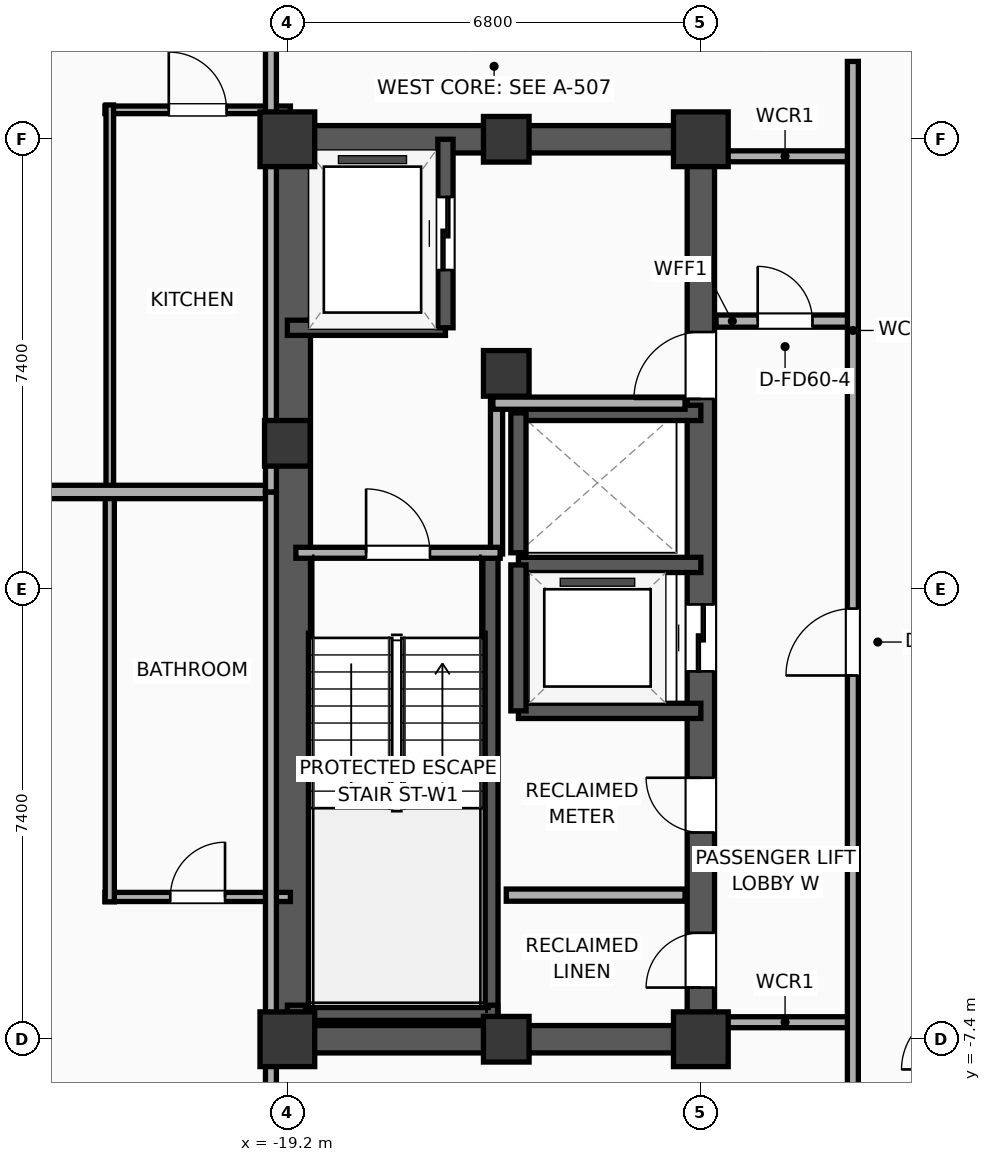
"""IFC4 building model, lengths in metres.
Left out: names, types, materials, properties, quantities, classifications, styles, units other than length and angle.
Written with IfcOpenShell. Run it as: python <this file> out.ifc"""

import sys

from ifc_helpers import new_model, si_unit, direction, frame, frame_2d, origin, origin_2d, place, context, subcontext, project, spatial, rectangle, extrude, element, fill, save


model = new_model("IFC4")
c1 = context("Model", 3, precision=1e-05, world=origin(), true_north=direction((0.0, 1.0)))
c2 = subcontext(c1, "Body", "Model", "MODEL_VIEW")
j1 = project(units=[si_unit("LENGTHUNIT", "METRE"), si_unit("PLANEANGLEUNIT", "RADIAN")], contexts=[c1])
p1 = place(None, origin())
s1 = spatial("IfcSite", under=j1, at=p1, CompositionType="ELEMENT")
p2 = place(p1, origin())
s2 = spatial("IfcBuilding", under=s1, at=p2, CompositionType="ELEMENT")
p3 = place(p2, frame((0.0, 0.0, 167.7)))
s3 = spatial("IfcBuildingStorey", under=s2, at=p3, CompositionType="ELEMENT", Elevation=167.7)
p4 = place(p3, frame((-19.2, -7.4, 0.0), z_axis=(0.0, 0.0, 1.0), x_axis=(1.0, 0.0, 0.0)))
e1 = element("IfcColumn", 1, at=p4, inside=s3, PredefinedType="COLUMN", context=c2, shape_type="SweptSolid", body=[
    extrude(rectangle(XDim=0.9, YDim=0.9, at=origin_2d()), origin(), (0.0, 0.0, 1.0), 3.9),
])
p5 = place(p3, frame((-19.2, 2.4, 0.0), z_axis=(0.0, 0.0, 1.0), x_axis=(1.0, 0.0, 0.0)))
e2 = element("IfcColumn", 2, at=p5, inside=s3, PredefinedType="COLUMN", context=c2, shape_type="SweptSolid", body=[
    extrude(rectangle(XDim=0.75, YDim=0.75, at=origin_2d()), origin(), (0.0, 0.0, 1.0), 3.9),
])
p6 = place(p3, frame((-19.2, 7.4, 0.0), z_axis=(0.0, 0.0, 1.0), x_axis=(1.0, 0.0, 0.0)))
e3 = element("IfcColumn", 3, at=p6, inside=s3, PredefinedType="COLUMN", context=c2, shape_type="SweptSolid", body=[
    extrude(rectangle(XDim=0.9, YDim=0.9, at=origin_2d()), origin(), (0.0, 0.0, 1.0), 3.9),
])
for number, where, z_axis, x_axis in (
    (4, (-15.6, -7.4, 0.0), (0.0, 0.0, 1.0), (1.0, 0.0, 0.0)),
    (5, (-15.6, 7.4, 0.0), (0.0, 0.0, 1.0), (1.0, 0.0, 0.0)),
):
    element("IfcColumn", number, at=place(p3, frame(where, z_axis=z_axis, x_axis=x_axis)), inside=s3, PredefinedType="COLUMN", context=c2, shape_type="SweptSolid", body=[
        extrude(rectangle(XDim=0.75, YDim=0.75, at=origin_2d()), origin(), (0.0, 0.0, 1.0), 3.9),
    ])
p7 = place(p3, frame((-12.4, -7.4, 0.0), z_axis=(0.0, 0.0, 1.0), x_axis=(1.0, 0.0, 0.0)))
e6 = element("IfcColumn", 6, at=p7, inside=s3, PredefinedType="COLUMN", context=c2, shape_type="SweptSolid", body=[
    extrude(rectangle(XDim=0.9, YDim=0.9, at=origin_2d()), origin(), (0.0, 0.0, 1.0), 3.9),
])
p8 = place(p3, frame((-15.6, 3.55, 0.0), z_axis=(0.0, 0.0, 1.0), x_axis=(1.0, 0.0, 0.0)))
e7 = element("IfcColumn", 7, at=p8, inside=s3, PredefinedType="COLUMN", context=c2, shape_type="SweptSolid", body=[
    extrude(rectangle(XDim=0.75, YDim=0.75, at=origin_2d()), origin(), (0.0, 0.0, 1.0), 3.9),
])
p9 = place(p3, frame((-12.4, 7.4, 0.0), z_axis=(0.0, 0.0, 1.0), x_axis=(1.0, 0.0, 0.0)))
e8 = element("IfcColumn", 8, at=p9, inside=s3, PredefinedType="COLUMN", context=c2, shape_type="SweptSolid", body=[
    extrude(rectangle(XDim=0.9, YDim=0.9, at=origin_2d()), origin(), (0.0, 0.0, 1.0), 3.9),
])
for number, where, z_axis, x_axis in (
    (9, (-19.425, -7.4, 0.0), (0.0, 0.0, 1.0), (1.0, 0.0, 0.0)),
    (10, (-19.425, 7.4, 0.0), (0.0, 0.0, 1.0), (1.0, 0.0, 0.0)),
):
    element("IfcWall", number, at=place(p3, frame(where, z_axis=z_axis, x_axis=x_axis)), inside=s3, PredefinedType="SHEAR", context=c2, shape_type="SweptSolid", body=[
        extrude(rectangle(XDim=7.25, YDim=0.45, at=frame_2d((3.625, 0.0))), origin(), (0.0, 0.0, 1.0), 3.65),
    ])
p10 = place(p3, frame((-19.145, -7.4, 0.0), z_axis=(0.0, 0.0, 1.0), x_axis=(0.0, 1.0, 0.0)))
e11 = element("IfcWall", 11, at=p10, inside=s3, PredefinedType="SHEAR", context=c2, shape_type="SweptSolid", body=[
    extrude(rectangle(XDim=14.8, YDim=0.65, at=frame_2d((7.4, 0.0))), origin(), (0.0, 0.0, 1.0), 3.65),
])
p11 = place(p3, frame((-12.4, -7.4, 0.0), z_axis=(0.0, 0.0, 1.0), x_axis=(0.0, 1.0, 0.0)))
e12 = element("IfcWall", 12, at=p11, inside=s3, PredefinedType="SHEAR", context=c2, shape_type="SweptSolid", body=[
    extrude(rectangle(XDim=14.8, YDim=0.45, at=frame_2d((7.4, 0.0))), origin(), (0.0, 0.0, 1.0), 3.65),
])
p12 = place(p11, frame((6.05, 0.0, 0.0)))
e13 = element("IfcOpeningElement", 13, at=p12, cuts=e12, PredefinedType="OPENING", context=c2, shape_type="SweptSolid", body=[
    extrude(rectangle(XDim=1.1, YDim=2.05, at=frame_2d((0.55, 1.025))), frame((0.0, 0.235, 0.0), z_axis=(0.0, -1.0, 0.0), x_axis=(1.0, 0.0, 0.0)), (0.0, 0.0, 1.0), 0.47),
])
p13 = place(p11, frame((10.53, 0.0, 0.0)))
e14 = element("IfcOpeningElement", 14, at=p13, cuts=e12, PredefinedType="OPENING", context=c2, shape_type="SweptSolid", body=[
    extrude(rectangle(XDim=1.1, YDim=2.05, at=frame_2d((0.55, 1.025))), frame((0.0, 0.235, 0.0), z_axis=(0.0, -1.0, 0.0), x_axis=(1.0, 0.0, 0.0)), (0.0, 0.0, 1.0), 0.47),
])
p14 = place(p11, frame((0.85, 0.0, 0.0)))
e15 = element("IfcOpeningElement", 15, at=p14, cuts=e12, PredefinedType="OPENING", context=c2, shape_type="SweptSolid", body=[
    extrude(rectangle(XDim=0.9, YDim=2.05, at=frame_2d((0.45, 1.025))), frame((0.0, 0.235, 0.0), z_axis=(0.0, -1.0, 0.0), x_axis=(1.0, 0.0, 0.0)), (0.0, 0.0, 1.0), 0.47),
])
p15 = place(p11, frame((3.4, 0.0, 0.0)))
e16 = element("IfcOpeningElement", 16, at=p15, cuts=e12, PredefinedType="OPENING", context=c2, shape_type="SweptSolid", body=[
    extrude(rectangle(XDim=0.9, YDim=2.05, at=frame_2d((0.45, 1.025))), frame((0.0, 0.235, 0.0), z_axis=(0.0, -1.0, 0.0), x_axis=(1.0, 0.0, 0.0)), (0.0, 0.0, 1.0), 0.47),
])
p16 = place(p3, frame((-15.86, -7.085, 0.0), z_axis=(0.0, 0.0, 1.0), x_axis=(0.0, 1.0, 0.0)))
e17 = element("IfcWall", 17, at=p16, inside=s3, PredefinedType="SOLIDWALL", context=c2, shape_type="SweptSolid", body=[
    extrude(rectangle(XDim=7.685, YDim=0.25, at=frame_2d((3.843, 0.0))), origin(), (0.0, 0.0, 1.0), 3.65),
])
p17 = place(p3, frame((-19.2, -6.965, 0.0), z_axis=(0.0, 0.0, 1.0), x_axis=(1.0, 0.0, 0.0)))
e18 = element("IfcWall", 18, at=p17, inside=s3, PredefinedType="SOLIDWALL", context=c2, shape_type="SweptSolid", body=[
    extrude(rectangle(XDim=3.46, YDim=0.25, at=frame_2d((1.73, 0.0))), origin(), (0.0, 0.0, 1.0), 3.65),
])
p18 = place(p3, frame((-19.2, 4.3, 0.0), z_axis=(0.0, 0.0, 1.0), x_axis=(1.0, 0.0, 0.0)))
e19 = element("IfcWall", 19, at=p18, inside=s3, PredefinedType="SOLIDWALL", context=c2, shape_type="SweptSolid", body=[
    extrude(rectangle(XDim=2.6, YDim=0.25, at=frame_2d((1.3, 0.0))), origin(), (0.0, 0.0, 1.0), 3.65),
])
p19 = place(p3, frame((-16.6, 4.3, 0.0), z_axis=(0.0, 0.0, 1.0), x_axis=(0.0, 1.0, 0.0)))
e20 = element("IfcWall", 20, at=p19, inside=s3, PredefinedType="SOLIDWALL", context=c2, shape_type="SweptSolid", body=[
    extrude(rectangle(XDim=3.1, YDim=0.25, at=frame_2d((1.55, 0.0))), origin(), (0.0, 0.0, 1.0), 3.65),
])
p20 = place(p19, frame((0.95, 0.0, 0.0)))
e21 = element("IfcOpeningElement", 21, at=p20, cuts=e20, PredefinedType="OPENING", context=c2, shape_type="SweptSolid", body=[
    extrude(rectangle(XDim=1.2, YDim=2.05, at=frame_2d((0.6, 1.025))), frame((0.0, 0.135, 0.0), z_axis=(0.0, -1.0, 0.0), x_axis=(1.0, 0.0, 0.0)), (0.0, 0.0, 1.0), 0.27),
])
for number, where, z_axis, x_axis in (
    (22, (-15.4, -2.0, 0.0), (0.0, 0.0, 1.0), (1.0, 0.0, 0.0)),
    (23, (-12.4, 0.4, 0.0), (0.0, 0.0, 1.0), (-1.0, 0.0, 0.0)),
):
    element("IfcWall", number, at=place(p3, frame(where, z_axis=z_axis, x_axis=x_axis)), inside=s3, PredefinedType="SOLIDWALL", context=c2, shape_type="SweptSolid", body=[
        extrude(rectangle(XDim=3.0, YDim=0.25, at=frame_2d((1.5, 0.0))), origin(), (0.0, 0.0, 1.0), 3.65),
    ])
p21 = place(p3, frame((-15.4, 0.4, 0.0), z_axis=(0.0, 0.0, 1.0), x_axis=(0.0, -1.0, 0.0)))
e24 = element("IfcWall", 24, at=p21, inside=s3, PredefinedType="SOLIDWALL", context=c2, shape_type="SweptSolid", body=[
    extrude(rectangle(XDim=2.4, YDim=0.25, at=frame_2d((1.2, 0.0))), origin(), (0.0, 0.0, 1.0), 3.65),
])
p22 = place(p3, frame((-12.4, 2.9, 0.0), z_axis=(0.0, 0.0, 1.0), x_axis=(-1.0, 0.0, 0.0)))
e25 = element("IfcWall", 25, at=p22, inside=s3, PredefinedType="SOLIDWALL", context=c2, shape_type="SweptSolid", body=[
    extrude(rectangle(XDim=3.0, YDim=0.25, at=frame_2d((1.5, 0.0))), origin(), (0.0, 0.0, 1.0), 3.65),
])
p23 = place(p3, frame((-15.4, 2.9, 0.0), z_axis=(0.0, 0.0, 1.0), x_axis=(0.0, -1.0, 0.0)))
e26 = element("IfcWall", 26, at=p23, inside=s3, PredefinedType="SOLIDWALL", context=c2, shape_type="SweptSolid", body=[
    extrude(rectangle(XDim=2.3, YDim=0.25, at=frame_2d((1.15, 0.0))), origin(), (0.0, 0.0, 1.0), 3.65),
])
p24 = place(p3, frame((-15.76, 0.58, 0.0), z_axis=(0.0, 0.0, 1.0), x_axis=(0.0, 1.0, 0.0)))
e27 = element("IfcWall", 27, at=p24, inside=s3, PredefinedType="PARTITIONING", context=c2, shape_type="SweptSolid", body=[
    extrude(rectangle(XDim=2.52, YDim=0.2, at=frame_2d((1.26, 0.0))), origin(), (0.0, 0.0, 1.0), 3.65),
])
p25 = place(p3, frame((-15.82, 3.06, 0.0), z_axis=(0.0, 0.0, 1.0), x_axis=(1.0, 0.0, 0.0)))
e28 = element("IfcWall", 28, at=p25, inside=s3, PredefinedType="PARTITIONING", context=c2, shape_type="SweptSolid", body=[
    extrude(rectangle(XDim=3.16, YDim=0.2, at=frame_2d((1.58, 0.0))), origin(), (0.0, 0.0, 1.0), 3.65),
])
p26 = place(p3, frame((-19.06, 0.6, 0.0), z_axis=(0.0, 0.0, 1.0), x_axis=(1.0, 0.0, 0.0)))
e29 = element("IfcWall", 29, at=p26, inside=s3, PredefinedType="PARTITIONING", context=c2, shape_type="SweptSolid", body=[
    extrude(rectangle(XDim=3.36, YDim=0.18, at=frame_2d((1.68, 0.0))), origin(), (0.0, 0.0, 1.0), 3.65),
])
p27 = place(p26, frame((1.155, 0.0, 0.0)))
e30 = element("IfcOpeningElement", 30, at=p27, cuts=e29, PredefinedType="OPENING", context=c2, shape_type="SweptSolid", body=[
    extrude(rectangle(XDim=1.05, YDim=2.05, at=frame_2d((0.525, 1.025))), frame((0.0, 0.1, 0.0), z_axis=(0.0, -1.0, 0.0), x_axis=(1.0, 0.0, 0.0)), (0.0, 0.0, 1.0), 0.2),
])
p28 = place(p3, frame((-15.6, -5.03, 0.0), z_axis=(0.0, 0.0, 1.0), x_axis=(1.0, 0.0, 0.0)))
e31 = element("IfcWall", 31, at=p28, inside=s3, PredefinedType="PARTITIONING", context=c2, shape_type="SweptSolid", body=[
    extrude(rectangle(XDim=2.94, YDim=0.2, at=frame_2d((1.47, 0.0))), origin(), (0.0, 0.0, 1.0), 3.65),
])
p29 = place(p3, frame((-12.15, 4.41, 0.0), z_axis=(0.0, 0.0, 1.0), x_axis=(1.0, 0.0, 0.0)))
e32 = element("IfcWall", 32, at=p29, inside=s3, PredefinedType="PARTITIONING", context=c2, shape_type="SweptSolid", body=[
    extrude(rectangle(XDim=2.27, YDim=0.2, at=frame_2d((1.135, 0.0))), origin(), (0.0, 0.0, 1.0), 3.65),
])
p30 = place(p29, frame((0.685, 0.0, 0.0)))
e33 = element("IfcOpeningElement", 33, at=p30, cuts=e32, PredefinedType="OPENING", context=c2, shape_type="SweptSolid", body=[
    extrude(rectangle(XDim=0.9, YDim=2.05, at=frame_2d((0.45, 1.025))), frame((0.0, 0.11, 0.0), z_axis=(0.0, -1.0, 0.0), x_axis=(1.0, 0.0, 0.0)), (0.0, 0.0, 1.0), 0.22),
])
for number, where, z_axis, x_axis in (
    (34, (-12.15, 7.12, 0.0), (0.0, 0.0, 1.0), (1.0, 0.0, 0.0)),
    (35, (-12.15, -7.12, 0.0), (0.0, 0.0, 1.0), (1.0, 0.0, 0.0)),
):
    element("IfcWall", number, at=place(p3, frame(where, z_axis=z_axis, x_axis=x_axis)), inside=s3, PredefinedType="PARTITIONING", context=c2, shape_type="SweptSolid", body=[
        extrude(rectangle(XDim=2.27, YDim=0.18, at=frame_2d((1.135, 0.0))), origin(), (0.0, 0.0, 1.0), 3.65),
    ])
p31 = place(p3, frame((-9.9, -8.68, 0.0), z_axis=(0.0, 0.0, 1.0), x_axis=(0.0, 1.0, 0.0)))
e36 = element("IfcWall", 36, at=p31, inside=s3, PredefinedType="PARTITIONING", context=c2, shape_type="SweptSolid", body=[
    extrude(rectangle(XDim=17.36, YDim=0.18, at=frame_2d((8.68, 0.0))), origin(), (0.0, 0.0, 1.0), 3.65),
])
p32 = place(p31, frame((7.262, 0.0, 0.0)))
e37 = element("IfcOpeningElement", 37, at=p32, cuts=e36, PredefinedType="OPENING", context=c2, shape_type="SweptSolid", body=[
    extrude(rectangle(XDim=1.1, YDim=2.05, at=frame_2d((0.55, 1.025))), frame((0.0, 0.1, 0.0), z_axis=(0.0, -1.0, 0.0), x_axis=(1.0, 0.0, 0.0)), (0.0, 0.0, 1.0), 0.2),
])
p33 = place(p3, frame((-22.2, -5.06, 0.0), z_axis=(0.0, 0.0, 1.0), x_axis=(1.0, 0.0, 0.0)))
e38 = element("IfcWall", 38, at=p33, inside=s3, PredefinedType="PLUMBINGWALL", context=c2, shape_type="SweptSolid", body=[
    extrude(rectangle(XDim=3.05, YDim=0.15, at=frame_2d((1.525, 0.0))), origin(), (0.0, 0.0, 1.0), 3.65),
])
p34 = place(p33, frame((1.075, 0.0, 0.0)))
e39 = element("IfcOpeningElement", 39, at=p34, cuts=e38, PredefinedType="OPENING", context=c2, shape_type="SweptSolid", body=[
    extrude(rectangle(XDim=0.9, YDim=2.05, at=frame_2d((0.45, 1.025))), frame((0.0, 0.085, 0.0), z_axis=(0.0, -1.0, 0.0), x_axis=(1.0, 0.0, 0.0)), (0.0, 0.0, 1.0), 0.17),
])
p35 = place(p3, frame((-22.12, -5.14, 0.0), z_axis=(0.0, 0.0, 1.0), x_axis=(0.0, 1.0, 0.0)))
e40 = element("IfcWall", 40, at=p35, inside=s3, PredefinedType="PLUMBINGWALL", context=c2, shape_type="SweptSolid", body=[
    extrude(rectangle(XDim=6.72, YDim=0.15, at=frame_2d((3.36, 0.0))), origin(), (0.0, 0.0, 1.0), 3.65),
])
p36 = place(p3, frame((-22.2, 7.884, 0.0), z_axis=(0.0, 0.0, 1.0), x_axis=(1.0, 0.0, 0.0)))
e41 = element("IfcWall", 41, at=p36, inside=s3, PredefinedType="PARTITIONING", context=c2, shape_type="SweptSolid", body=[
    extrude(rectangle(XDim=3.05, YDim=0.125, at=frame_2d((1.525, 0.0))), origin(), (0.0, 0.0, 1.0), 3.65),
])
p37 = place(p36, frame((1.05, 0.0, 0.0)))
e42 = element("IfcOpeningElement", 42, at=p37, cuts=e41, PredefinedType="OPENING", context=c2, shape_type="SweptSolid", body=[
    extrude(rectangle(XDim=0.95, YDim=2.05, at=frame_2d((0.475, 1.025))), frame((0.0, 0.073, 0.0), z_axis=(0.0, -1.0, 0.0), x_axis=(1.0, 0.0, 0.0)), (0.0, 0.0, 1.0), 0.145),
])
p38 = place(p3, frame((-22.12, 1.62, 0.0), z_axis=(0.0, 0.0, 1.0), x_axis=(0.0, 1.0, 0.0)))
e43 = element("IfcWall", 43, at=p38, inside=s3, PredefinedType="PARTITIONING", context=c2, shape_type="SweptSolid", body=[
    extrude(rectangle(XDim=6.344, YDim=0.125, at=frame_2d((3.172, 0.0))), origin(), (0.0, 0.0, 1.0), 3.65),
])
p39 = place(p3, frame((-19.47, 1.6, 0.0), z_axis=(0.0, 0.0, 1.0), x_axis=(-1.0, 0.0, 0.0)))
e44 = element("IfcWall", 44, at=p39, inside=s3, PredefinedType="PARTITIONING", context=c2, shape_type="SweptSolid", body=[
    extrude(rectangle(XDim=13.754, YDim=0.22, at=frame_2d((6.877, 0.0))), origin(), (0.0, 0.0, 1.0), 3.65),
])
p40 = place(p3, frame((-19.47, -22.652, 0.0), z_axis=(0.0, 0.0, 1.0), x_axis=(0.0, 1.0, 0.0)))
e45 = element("IfcWall", 45, at=p40, inside=s3, PredefinedType="PARTITIONING", context=c2, shape_type="SweptSolid", body=[
    extrude(rectangle(XDim=24.252, YDim=0.18, at=frame_2d((12.126, 0.0))), origin(), (0.0, 0.0, 1.0), 3.65),
])
p41 = place(p40, frame((12.871, 0.0, 0.0)))
e46 = element("IfcOpeningElement", 46, at=p41, cuts=e45, PredefinedType="OPENING", context=c2, shape_type="SweptSolid", body=[
    extrude(rectangle(XDim=0.9, YDim=2.05, at=frame_2d((0.45, 1.025))), frame((0.0, 0.1, 0.0), z_axis=(0.0, -1.0, 0.0), x_axis=(1.0, 0.0, 0.0)), (0.0, 0.0, 1.0), 0.2),
])
p42 = place(p3, frame((-19.47, 1.6, 0.0), z_axis=(0.0, 0.0, 1.0), x_axis=(0.0, 1.0, 0.0)))
e47 = element("IfcWall", 47, at=p42, inside=s3, PredefinedType="PARTITIONING", context=c2, shape_type="SweptSolid", body=[
    extrude(rectangle(XDim=16.431, YDim=0.18, at=frame_2d((8.216, 0.0))), origin(), (0.0, 0.0, 1.0), 3.04),
])
p43 = place(p42, frame((7.279, 0.0, 0.0)))
e48 = element("IfcOpeningElement", 48, at=p43, cuts=e47, PredefinedType="OPENING", context=c2, shape_type="SweptSolid", body=[
    extrude(rectangle(XDim=0.9, YDim=2.05, at=frame_2d((0.45, 1.025))), frame((0.0, 0.1, 0.0), z_axis=(0.0, -1.0, 0.0), x_axis=(1.0, 0.0, 0.0)), (0.0, 0.0, 1.0), 0.2),
])
p44 = place(p20, origin())
e49 = element("IfcDoor", 49, at=p44, inside=s3, OperationType="SLIDING_TO_LEFT", PredefinedType="DOOR", context=c2, shape_type="SweptSolid", body=[
    extrude(rectangle(XDim=1.2, YDim=2.05, at=frame_2d((0.6, 1.025))), frame((0.0, 0.025, 0.0), z_axis=(0.0, -1.0, 0.0), x_axis=(1.0, 0.0, 0.0)), (0.0, 0.0, 1.0), 0.05),
])
fill(e21, e49)
p45 = place(p12, origin())
e50 = element("IfcDoor", 50, at=p45, inside=s3, OperationType="SLIDING_TO_LEFT", PredefinedType="DOOR", context=c2, shape_type="SweptSolid", body=[
    extrude(rectangle(XDim=1.1, YDim=2.05, at=frame_2d((0.55, 1.025))), frame((0.0, 0.025, 0.0), z_axis=(0.0, -1.0, 0.0), x_axis=(1.0, 0.0, 0.0)), (0.0, 0.0, 1.0), 0.05),
])
fill(e13, e50)
p46 = place(p27, origin())
e51 = element("IfcDoor", 51, at=p46, inside=s3, OperationType="SINGLE_SWING_LEFT", PredefinedType="DOOR", context=c2, shape_type="SweptSolid", body=[
    extrude(rectangle(XDim=1.05, YDim=2.05, at=frame_2d((0.525, 1.025))), frame((0.0, 0.025, 0.0), z_axis=(0.0, -1.0, 0.0), x_axis=(1.0, 0.0, 0.0)), (0.0, 0.0, 1.0), 0.05),
])
fill(e30, e51)
p47 = place(p30, origin())
e52 = element("IfcDoor", 52, at=p47, inside=s3, OperationType="SINGLE_SWING_LEFT", PredefinedType="DOOR", context=c2, shape_type="SweptSolid", body=[
    extrude(rectangle(XDim=0.9, YDim=2.05, at=frame_2d((0.45, 1.025))), frame((0.0, 0.025, 0.0), z_axis=(0.0, -1.0, 0.0), x_axis=(1.0, 0.0, 0.0)), (0.0, 0.0, 1.0), 0.05),
])
fill(e33, e52)
p48 = place(p32, origin())
e53 = element("IfcDoor", 53, at=p48, inside=s3, OperationType="SINGLE_SWING_LEFT", PredefinedType="DOOR", context=c2, shape_type="SweptSolid", body=[
    extrude(rectangle(XDim=1.1, YDim=2.05, at=frame_2d((0.55, 1.025))), frame((0.0, 0.025, 0.0), z_axis=(0.0, -1.0, 0.0), x_axis=(1.0, 0.0, 0.0)), (0.0, 0.0, 1.0), 0.05),
])
fill(e37, e53)
p49 = place(p34, origin())
e54 = element("IfcDoor", 54, at=p49, inside=s3, OperationType="SINGLE_SWING_RIGHT", PredefinedType="DOOR", context=c2, shape_type="SweptSolid", body=[
    extrude(rectangle(XDim=0.9, YDim=2.05, at=frame_2d((0.45, 1.025))), frame((0.0, 0.025, 0.0), z_axis=(0.0, -1.0, 0.0), x_axis=(1.0, 0.0, 0.0)), (0.0, 0.0, 1.0), 0.05),
])
fill(e39, e54)
p50 = place(p37, origin())
e55 = element("IfcDoor", 55, at=p50, inside=s3, OperationType="SINGLE_SWING_LEFT", PredefinedType="DOOR", context=c2, shape_type="SweptSolid", body=[
    extrude(rectangle(XDim=0.95, YDim=2.05, at=frame_2d((0.475, 1.025))), frame((0.0, 0.025, 0.0), z_axis=(0.0, -1.0, 0.0), x_axis=(1.0, 0.0, 0.0)), (0.0, 0.0, 1.0), 0.05),
])
fill(e42, e55)
p51 = place(p13, origin())
e56 = element("IfcDoor", 56, at=p51, inside=s3, OperationType="SINGLE_SWING_LEFT", PredefinedType="DOOR", context=c2, shape_type="SweptSolid", body=[
    extrude(rectangle(XDim=1.1, YDim=2.05, at=frame_2d((0.55, 1.025))), frame((0.0, 0.025, 0.0), z_axis=(0.0, -1.0, 0.0), x_axis=(1.0, 0.0, 0.0)), (0.0, 0.0, 1.0), 0.05),
])
fill(e14, e56)
p52 = place(p14, origin())
e57 = element("IfcDoor", 57, at=p52, inside=s3, OperationType="SINGLE_SWING_LEFT", PredefinedType="DOOR", context=c2, shape_type="SweptSolid", body=[
    extrude(rectangle(XDim=0.9, YDim=2.05, at=frame_2d((0.45, 1.025))), frame((0.0, 0.025, 0.0), z_axis=(0.0, -1.0, 0.0), x_axis=(1.0, 0.0, 0.0)), (0.0, 0.0, 1.0), 0.05),
])
fill(e15, e57)
p53 = place(p15, origin())
e58 = element("IfcDoor", 58, at=p53, inside=s3, OperationType="SINGLE_SWING_RIGHT", PredefinedType="DOOR", context=c2, shape_type="SweptSolid", body=[
    extrude(rectangle(XDim=0.9, YDim=2.05, at=frame_2d((0.45, 1.025))), frame((0.0, 0.025, 0.0), z_axis=(0.0, -1.0, 0.0), x_axis=(1.0, 0.0, 0.0)), (0.0, 0.0, 1.0), 0.05),
])
fill(e16, e58)
save(model, sys.argv[1])
